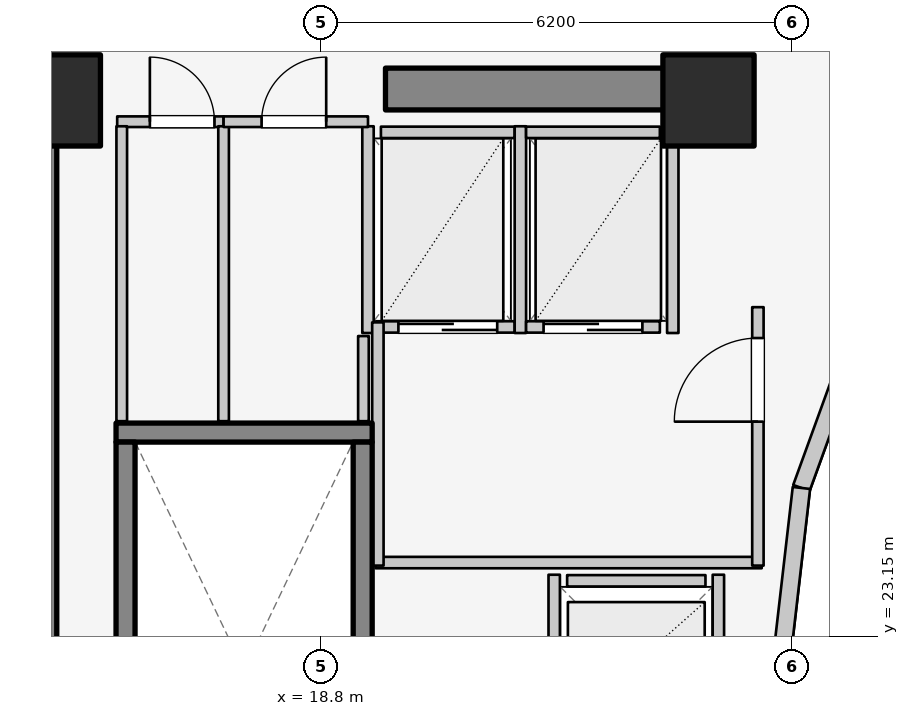
"""IFC4 building model, lengths in metres.
Left out: names, types, materials, properties, quantities, classifications, styles, units other than length and angle.
Written with IfcOpenShell. Run it as: python <this file> out.ifc"""

import sys

from ifc_helpers import new_model, si_unit, direction, frame, frame_2d, origin, origin_2d, place, context, subcontext, project, spatial, rectangle, extrude, element, fill, save


model = new_model("IFC4")
c1 = context("Model", 3, precision=1e-05, world=origin(), true_north=direction((0.0, 1.0)))
c2 = subcontext(c1, "Body", "Model", "MODEL_VIEW")
j1 = project(units=[si_unit("LENGTHUNIT", "METRE"), si_unit("PLANEANGLEUNIT", "RADIAN")], contexts=[c1])
p1 = place(None, origin())
s1 = spatial("IfcSite", under=j1, at=p1, CompositionType="ELEMENT")
p2 = place(p1, origin())
s2 = spatial("IfcBuilding", under=s1, at=p2, CompositionType="ELEMENT")
p3 = place(p2, frame((0.0, 0.0, 235.7)))
s3 = spatial("IfcBuildingStorey", under=s2, at=p3, CompositionType="ELEMENT", Elevation=235.7)
p4 = place(p3, frame((15.05, 17.05, 0.0), z_axis=(0.0, 0.0, 1.0), x_axis=(0.0, 1.0, 0.0)))
e1 = element("IfcWall", 1, at=p4, inside=s3, PredefinedType="SHEAR", context=c2, shape_type="SweptSolid", body=[
    extrude(rectangle(XDim=12.8, YDim=0.55, at=frame_2d((6.4, 0.0))), origin(), (0.0, 0.0, 1.0), 3.1),
])
p5 = place(p3, frame((19.65, 30.35, 0.0), z_axis=(0.0, 0.0, 1.0), x_axis=(1.0, 0.0, 0.0)))
e2 = element("IfcWall", 2, at=p5, inside=s3, PredefinedType="SHEAR", context=c2, shape_type="SweptSolid", body=[
    extrude(rectangle(XDim=4.5, YDim=0.55, at=frame_2d((2.25, 0.0))), origin(), (0.0, 0.0, 1.0), 3.1),
])
p6 = place(p3, frame((16.105, 25.83, 0.0), z_axis=(0.0, 0.0, 1.0), x_axis=(1.0, 0.0, 0.0)))
e3 = element("IfcWall", 3, at=p6, inside=s3, PredefinedType="SOLIDWALL", context=c2, shape_type="SweptSolid", body=[
    extrude(rectangle(XDim=3.37, YDim=0.25, at=frame_2d((1.685, 0.0))), origin(), (0.0, 0.0, 1.0), 3.1),
])
for number, where, z_axis, x_axis in (
    (4, (16.23, 17.895, 0.0), (0.0, 0.0, 1.0), (0.0, 1.0, 0.0)),
    (5, (19.35, 17.895, 0.0), (0.0, 0.0, 1.0), (0.0, 1.0, 0.0)),
):
    element("IfcWall", number, at=place(p3, frame(where, z_axis=z_axis, x_axis=x_axis)), inside=s3, PredefinedType="SOLIDWALL", context=c2, shape_type="SweptSolid", body=[
        extrude(rectangle(XDim=7.81, YDim=0.25, at=frame_2d((3.905, 0.0))), origin(), (0.0, 0.0, 1.0), 3.1),
    ])
for number, where, z_axis, x_axis in (
    (6, (23.9, 30.2, 0.0), (0.0, 0.0, 1.0), (1.0, 0.0, 0.0)),
    (7, (15.3, 30.2, 0.0), (0.0, 0.0, 1.0), (1.0, 0.0, 0.0)),
):
    element("IfcColumn", number, at=place(p3, frame(where, z_axis=z_axis, x_axis=x_axis)), inside=s3, PredefinedType="COLUMN", context=c2, shape_type="SweptSolid", body=[
        extrude(rectangle(XDim=1.2, YDim=1.2, at=origin_2d()), origin(), (0.0, 0.0, 1.0), 3.1),
    ])
p7 = place(p3, frame((25.834, 27.06, 0.0), z_axis=(0.0, 0.0, 1.0), x_axis=(-0.341423187295, -0.93990968033, 0.0)))
e8 = element("IfcWall", 8, at=p7, inside=s3, PredefinedType="STANDARD", context=c2, shape_type="SweptSolid", body=[
    extrude(rectangle(XDim=2.084, YDim=0.23, at=frame_2d((1.042, 0.0))), origin(), (0.0, 0.0, 1.0), 2.56),
])
p8 = place(p3, frame((25.123, 25.102, 0.0), z_axis=(0.0, 0.0, 1.0), x_axis=(-0.114711713601, -0.993398823617, 0.0)))
e9 = element("IfcWall", 9, at=p8, inside=s3, PredefinedType="STANDARD", context=c2, shape_type="SweptSolid", body=[
    extrude(rectangle(XDim=2.115, YDim=0.23, at=frame_2d((1.058, 0.0))), origin(), (0.0, 0.0, 1.0), 2.56),
])
p9 = place(p3, frame((22.04, 23.88, 0.0), z_axis=(0.0, 0.0, 1.0), x_axis=(1.0, 0.0, 0.0)))
e10 = element("IfcWall", 10, at=p9, inside=s3, PredefinedType="SOLIDWALL", context=c2, shape_type="SweptSolid", body=[
    extrude(rectangle(XDim=1.82, YDim=0.15, at=frame_2d((0.91, 0.0))), origin(), (0.0, 0.0, 1.0), 2.12),
])
p10 = place(p3, frame((21.87, 21.64, 0.0), z_axis=(0.0, 0.0, 1.0), x_axis=(0.0, 1.0, 0.0)))
e11 = element("IfcWall", 11, at=p10, inside=s3, PredefinedType="SOLIDWALL", context=c2, shape_type="SweptSolid", body=[
    extrude(rectangle(XDim=2.32, YDim=0.15, at=frame_2d((1.16, 0.0))), origin(), (0.0, 0.0, 1.0), 2.575),
])
p11 = place(p3, frame((24.03, 21.64, 0.0), z_axis=(0.0, 0.0, 1.0), x_axis=(0.0, 1.0, 0.0)))
e12 = element("IfcWall", 12, at=p11, inside=s3, PredefinedType="SOLIDWALL", context=c2, shape_type="SweptSolid", body=[
    extrude(rectangle(XDim=2.32, YDim=0.15, at=frame_2d((1.16, 0.0))), origin(), (0.0, 0.0, 1.0), 2.12),
])
p12 = place(p3, frame((19.59, 27.22, 0.0), z_axis=(0.0, 0.0, 1.0), x_axis=(1.0, 0.0, 0.0)))
e13 = element("IfcWall", 13, at=p12, inside=s3, PredefinedType="SOLIDWALL", context=c2, shape_type="SweptSolid", body=[
    extrude(rectangle(XDim=1.76, YDim=0.15, at=frame_2d((0.88, 0.0))), origin(), (0.0, 0.0, 1.0), 2.575),
])
p13 = place(p12, frame((0.23, 0.0, 0.0)))
e14 = element("IfcOpeningElement", 14, at=p13, cuts=e13, PredefinedType="OPENING", context=c2, shape_type="SweptSolid", body=[
    extrude(rectangle(XDim=1.3, YDim=2.1, at=frame_2d((0.65, 1.05))), frame((0.0, 0.085, 0.0), z_axis=(0.0, -1.0, 0.0), x_axis=(1.0, 0.0, 0.0)), (0.0, 0.0, 1.0), 0.17),
])
p14 = place(p3, frame((19.59, 29.78, 0.0), z_axis=(0.0, 0.0, 1.0), x_axis=(1.0, 0.0, 0.0)))
e15 = element("IfcWall", 15, at=p14, inside=s3, PredefinedType="SOLIDWALL", context=c2, shape_type="SweptSolid", body=[
    extrude(rectangle(XDim=1.76, YDim=0.15, at=frame_2d((0.88, 0.0))), origin(), (0.0, 0.0, 1.0), 2.575),
])
for number, where, z_axis, x_axis in (
    (16, (19.42, 27.14, 0.0), (0.0, 0.0, 1.0), (0.0, 1.0, 0.0)),
    (17, (21.425, 27.14, 0.0), (0.0, 0.0, 1.0), (0.0, 1.0, 0.0)),
):
    element("IfcWall", number, at=place(p3, frame(where, z_axis=z_axis, x_axis=x_axis)), inside=s3, PredefinedType="SOLIDWALL", context=c2, shape_type="SweptSolid", body=[
        extrude(rectangle(XDim=2.72, YDim=0.15, at=frame_2d((1.36, 0.0))), origin(), (0.0, 0.0, 1.0), 2.575),
    ])
p15 = place(p3, frame((21.5, 27.22, 0.0), z_axis=(0.0, 0.0, 1.0), x_axis=(1.0, 0.0, 0.0)))
e18 = element("IfcWall", 18, at=p15, inside=s3, PredefinedType="SOLIDWALL", context=c2, shape_type="SweptSolid", body=[
    extrude(rectangle(XDim=1.76, YDim=0.15, at=frame_2d((0.88, 0.0))), origin(), (0.0, 0.0, 1.0), 2.575),
])
p16 = place(p15, frame((0.23, 0.0, 0.0)))
e19 = element("IfcOpeningElement", 19, at=p16, cuts=e18, PredefinedType="OPENING", context=c2, shape_type="SweptSolid", body=[
    extrude(rectangle(XDim=1.3, YDim=2.1, at=frame_2d((0.65, 1.05))), frame((0.0, 0.085, 0.0), z_axis=(0.0, -1.0, 0.0), x_axis=(1.0, 0.0, 0.0)), (0.0, 0.0, 1.0), 0.17),
])
p17 = place(p3, frame((21.5, 29.78, 0.0), z_axis=(0.0, 0.0, 1.0), x_axis=(1.0, 0.0, 0.0)))
e20 = element("IfcWall", 20, at=p17, inside=s3, PredefinedType="SOLIDWALL", context=c2, shape_type="SweptSolid", body=[
    extrude(rectangle(XDim=1.76, YDim=0.15, at=frame_2d((0.88, 0.0))), origin(), (0.0, 0.0, 1.0), 2.575),
])
p18 = place(p3, frame((23.43, 27.14, 0.0), z_axis=(0.0, 0.0, 1.0), x_axis=(0.0, 1.0, 0.0)))
e21 = element("IfcWall", 21, at=p18, inside=s3, PredefinedType="SOLIDWALL", context=c2, shape_type="SweptSolid", body=[
    extrude(rectangle(XDim=2.72, YDim=0.15, at=frame_2d((1.36, 0.0))), origin(), (0.0, 0.0, 1.0), 2.575),
])
p19 = place(p3, frame((19.52, 24.12, 0.0), z_axis=(0.0, 0.0, 1.0), x_axis=(1.0, 0.0, 0.0)))
e22 = element("IfcWall", 22, at=p19, inside=s3, PredefinedType="PARTITIONING", context=c2, shape_type="SweptSolid", body=[
    extrude(rectangle(XDim=5.08, YDim=0.15, at=frame_2d((2.54, 0.0))), origin(), (0.0, 0.0, 1.0), 2.12),
])
p20 = place(p3, frame((19.55, 24.08, 0.0), z_axis=(0.0, 0.0, 1.0), x_axis=(0.0, 1.0, 0.0)))
e23 = element("IfcWall", 23, at=p20, inside=s3, PredefinedType="PARTITIONING", context=c2, shape_type="SweptSolid", body=[
    extrude(rectangle(XDim=3.2, YDim=0.15, at=frame_2d((1.6, 0.0))), origin(), (0.0, 0.0, 1.0), 2.575),
])
p21 = place(p3, frame((24.55, 24.08, 0.0), z_axis=(0.0, 0.0, 1.0), x_axis=(0.0, 1.0, 0.0)))
e24 = element("IfcWall", 24, at=p21, inside=s3, PredefinedType="PARTITIONING", context=c2, shape_type="SweptSolid", body=[
    extrude(rectangle(XDim=3.4, YDim=0.15, at=frame_2d((1.7, 0.0))), origin(), (0.0, 0.0, 1.0), 2.575),
])
p22 = place(p21, frame((1.894, 0.0, 0.0)))
e25 = element("IfcOpeningElement", 25, at=p22, cuts=e24, PredefinedType="OPENING", context=c2, shape_type="SweptSolid", body=[
    extrude(rectangle(XDim=1.1, YDim=2.1, at=frame_2d((0.55, 1.05))), frame((0.0, 0.085, 0.0), z_axis=(0.0, -1.0, 0.0), x_axis=(1.0, 0.0, 0.0)), (0.0, 0.0, 1.0), 0.17),
])
p23 = place(p3, frame((16.12, 29.92, 0.0), z_axis=(0.0, 0.0, 1.0), x_axis=(1.0, 0.0, 0.0)))
e26 = element("IfcWall", 26, at=p23, inside=s3, PredefinedType="PLUMBINGWALL", context=c2, shape_type="SweptSolid", body=[
    extrude(rectangle(XDim=1.4, YDim=0.14, at=frame_2d((0.7, 0.0))), origin(), (0.0, 0.0, 1.0), 2.575),
])
p24 = place(p23, frame((0.43, 0.0, 0.0)))
e27 = element("IfcOpeningElement", 27, at=p24, cuts=e26, PredefinedType="OPENING", context=c2, shape_type="SweptSolid", body=[
    extrude(rectangle(XDim=0.85, YDim=2.05, at=frame_2d((0.425, 1.025))), frame((0.0, 0.08, 0.0), z_axis=(0.0, -1.0, 0.0), x_axis=(1.0, 0.0, 0.0)), (0.0, 0.0, 1.0), 0.16),
])
for number, where, z_axis, x_axis in (
    (28, (16.18, 25.98, 0.0), (0.0, 0.0, 1.0), (0.0, 1.0, 0.0)),
    (29, (17.52, 25.98, 0.0), (0.0, 0.0, 1.0), (0.0, 1.0, 0.0)),
):
    element("IfcWall", number, at=place(p3, frame(where, z_axis=z_axis, x_axis=x_axis)), inside=s3, PredefinedType="PLUMBINGWALL", context=c2, shape_type="SweptSolid", body=[
        extrude(rectangle(XDim=3.88, YDim=0.14, at=frame_2d((1.94, 0.0))), origin(), (0.0, 0.0, 1.0), 2.575),
    ])
p25 = place(p3, frame((17.52, 29.92, 0.0), z_axis=(0.0, 0.0, 1.0), x_axis=(1.0, 0.0, 0.0)))
e30 = element("IfcWall", 30, at=p25, inside=s3, PredefinedType="PLUMBINGWALL", context=c2, shape_type="SweptSolid", body=[
    extrude(rectangle(XDim=1.9, YDim=0.14, at=frame_2d((0.95, 0.0))), origin(), (0.0, 0.0, 1.0), 2.575),
])
p26 = place(p25, frame((0.5, 0.0, 0.0)))
e31 = element("IfcOpeningElement", 31, at=p26, cuts=e30, PredefinedType="OPENING", context=c2, shape_type="SweptSolid", body=[
    extrude(rectangle(XDim=0.85, YDim=2.05, at=frame_2d((0.425, 1.025))), frame((0.0, 0.08, 0.0), z_axis=(0.0, -1.0, 0.0), x_axis=(1.0, 0.0, 0.0)), (0.0, 0.0, 1.0), 0.16),
])
p27 = place(p3, frame((19.36, 25.98, 0.0), z_axis=(0.0, 0.0, 1.0), x_axis=(0.0, 1.0, 0.0)))
e32 = element("IfcWall", 32, at=p27, inside=s3, PredefinedType="PLUMBINGWALL", context=c2, shape_type="SweptSolid", body=[
    extrude(rectangle(XDim=1.12, YDim=0.14, at=frame_2d((0.56, 0.0))), origin(), (0.0, 0.0, 1.0), 2.575),
])
p28 = place(p13, origin())
e33 = element("IfcDoor", 33, at=p28, inside=s3, OperationType="DOUBLE_DOOR_SLIDING", PredefinedType="DOOR", context=c2, shape_type="SweptSolid", body=[
    extrude(rectangle(XDim=1.3, YDim=2.1, at=frame_2d((0.65, 1.05))), frame((0.0, 0.025, 0.0), z_axis=(0.0, -1.0, 0.0), x_axis=(1.0, 0.0, 0.0)), (0.0, 0.0, 1.0), 0.05),
])
fill(e14, e33)
p29 = place(p16, origin())
e34 = element("IfcDoor", 34, at=p29, inside=s3, OperationType="DOUBLE_DOOR_SLIDING", PredefinedType="DOOR", context=c2, shape_type="SweptSolid", body=[
    extrude(rectangle(XDim=1.3, YDim=2.1, at=frame_2d((0.65, 1.05))), frame((0.0, 0.025, 0.0), z_axis=(0.0, -1.0, 0.0), x_axis=(1.0, 0.0, 0.0)), (0.0, 0.0, 1.0), 0.05),
])
fill(e19, e34)
p30 = place(p22, origin())
e35 = element("IfcDoor", 35, at=p30, inside=s3, OperationType="SINGLE_SWING_LEFT", PredefinedType="DOOR", context=c2, shape_type="SweptSolid", body=[
    extrude(rectangle(XDim=1.1, YDim=2.1, at=frame_2d((0.55, 1.05))), frame((0.0, 0.025, 0.0), z_axis=(0.0, -1.0, 0.0), x_axis=(1.0, 0.0, 0.0)), (0.0, 0.0, 1.0), 0.05),
])
fill(e25, e35)
p31 = place(p24, origin())
e36 = element("IfcDoor", 36, at=p31, inside=s3, OperationType="SINGLE_SWING_LEFT", PredefinedType="DOOR", context=c2, shape_type="SweptSolid", body=[
    extrude(rectangle(XDim=0.85, YDim=2.05, at=frame_2d((0.425, 1.025))), frame((0.0, 0.025, 0.0), z_axis=(0.0, -1.0, 0.0), x_axis=(1.0, 0.0, 0.0)), (0.0, 0.0, 1.0), 0.05),
])
fill(e27, e36)
p32 = place(p26, origin())
e37 = element("IfcDoor", 37, at=p32, inside=s3, OperationType="SINGLE_SWING_RIGHT", PredefinedType="DOOR", context=c2, shape_type="SweptSolid", body=[
    extrude(rectangle(XDim=0.85, YDim=2.05, at=frame_2d((0.425, 1.025))), frame((0.0, 0.025, 0.0), z_axis=(0.0, -1.0, 0.0), x_axis=(1.0, 0.0, 0.0)), (0.0, 0.0, 1.0), 0.05),
])
fill(e31, e37)
save(model, sys.argv[1])
